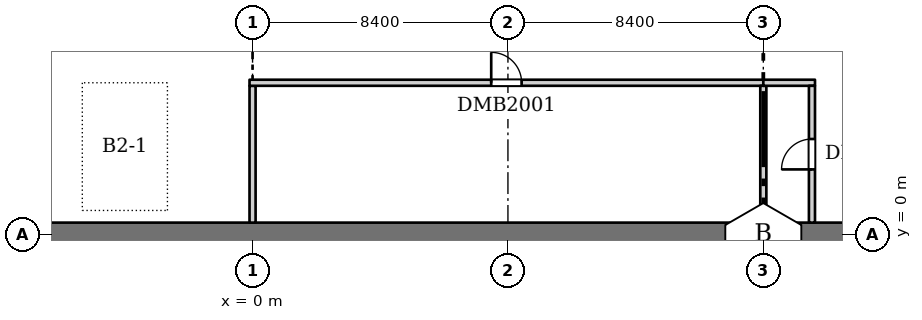
"""IFC4 building model, lengths in metres.
Left out: names, types, materials, properties, quantities, classifications, styles, units other than length and angle.
Written with IfcOpenShell. Run it as: python <this file> out.ifc"""

import sys

from ifc_helpers import new_model, si_unit, direction, frame, frame_2d, origin, place, context, subcontext, project, spatial, rectangle, extrude, element, fill, save


model = new_model("IFC4")
c1 = context("Model", 3, precision=1e-05, world=origin(), true_north=direction((0.0, 1.0)))
c2 = subcontext(c1, "Body", "Model", "MODEL_VIEW")
j1 = project(units=[si_unit("LENGTHUNIT", "METRE"), si_unit("PLANEANGLEUNIT", "RADIAN")], contexts=[c1])
p1 = place(None, origin())
s1 = spatial("IfcSite", under=j1, at=p1, CompositionType="ELEMENT")
p2 = place(p1, origin())
s2 = spatial("IfcBuilding", under=s1, at=p2, CompositionType="ELEMENT")
p3 = place(p2, frame((0.0, 0.0, -8.0)))
s3 = spatial("IfcBuildingStorey", under=s2, at=p3, CompositionType="ELEMENT", Elevation=-8.0)
p4 = place(p3, frame((-8.8, 0.0, 0.0), z_axis=(0.0, 0.0, 1.0), x_axis=(1.0, 0.0, 0.0)))
e1 = element("IfcWall", 1, at=p4, inside=s3, PredefinedType="SOLIDWALL", context=c2, shape_type="SweptSolid", body=[
    extrude(rectangle(XDim=76.0, YDim=0.8, at=frame_2d((38.0, 0.0))), origin(), (0.0, 0.0, 1.0), 3.7),
])
p5 = place(p3, frame((0.0, 0.4, 0.0), z_axis=(0.0, 0.0, 1.0), x_axis=(0.0, 1.0, 0.0)))
e2 = element("IfcWall", 2, at=p5, inside=s3, PredefinedType="PARTITIONING", context=c2, shape_type="SweptSolid", body=[
    extrude(rectangle(XDim=4.5, YDim=0.2, at=frame_2d((2.25, 0.0))), origin(), (0.0, 0.0, 1.0), 3.7),
])
p6 = place(p3, frame((-0.1, 5.0, 0.0), z_axis=(0.0, 0.0, 1.0), x_axis=(1.0, 0.0, 0.0)))
e3 = element("IfcWall", 3, at=p6, inside=s3, PredefinedType="PARTITIONING", context=c2, shape_type="SweptSolid", body=[
    extrude(rectangle(XDim=16.9, YDim=0.2, at=frame_2d((8.45, 0.0))), origin(), (0.0, 0.0, 1.0), 3.7),
])
p7 = place(p6, frame((7.95, 0.0, 0.0)))
e4 = element("IfcOpeningElement", 4, at=p7, cuts=e3, PredefinedType="OPENING", context=c2, shape_type="SweptSolid", body=[
    extrude(rectangle(XDim=1.0, YDim=2.1, at=frame_2d((0.5, 1.05))), frame((0.0, 0.11, 0.0), z_axis=(0.0, -1.0, 0.0), x_axis=(1.0, 0.0, 0.0)), (0.0, 0.0, 1.0), 0.22),
])
p8 = place(p3, frame((16.8, 0.4, 0.0), z_axis=(0.0, 0.0, 1.0), x_axis=(0.0, 1.0, 0.0)))
e5 = element("IfcWall", 5, at=p8, inside=s3, PredefinedType="PARTITIONING", context=c2, shape_type="SweptSolid", body=[
    extrude(rectangle(XDim=4.5, YDim=0.2, at=frame_2d((2.25, 0.0))), origin(), (0.0, 0.0, 1.0), 3.7),
])
p9 = place(p3, frame((16.8, 5.0, 0.0), z_axis=(0.0, 0.0, 1.0), x_axis=(1.0, 0.0, 0.0)))
e6 = element("IfcWall", 6, at=p9, inside=s3, PredefinedType="PARTITIONING", context=c2, shape_type="SweptSolid", body=[
    extrude(rectangle(XDim=1.7, YDim=0.2, at=frame_2d((0.85, 0.0))), origin(), (0.0, 0.0, 1.0), 3.7),
])
p10 = place(p3, frame((18.4, 0.4, 0.0), z_axis=(0.0, 0.0, 1.0), x_axis=(0.0, 1.0, 0.0)))
e7 = element("IfcWall", 7, at=p10, inside=s3, PredefinedType="PARTITIONING", context=c2, shape_type="SweptSolid", body=[
    extrude(rectangle(XDim=4.5, YDim=0.2, at=frame_2d((2.25, 0.0))), origin(), (0.0, 0.0, 1.0), 3.7),
])
p11 = place(p10, frame((1.75, 0.0, 0.0)))
e8 = element("IfcOpeningElement", 8, at=p11, cuts=e7, PredefinedType="OPENING", context=c2, shape_type="SweptSolid", body=[
    extrude(rectangle(XDim=1.0, YDim=2.1, at=frame_2d((0.5, 1.05))), frame((0.0, 0.11, 0.0), z_axis=(0.0, -1.0, 0.0), x_axis=(1.0, 0.0, 0.0)), (0.0, 0.0, 1.0), 0.22),
])
p12 = place(p7, origin())
e9 = element("IfcDoor", 9, at=p12, inside=s3, OperationType="SINGLE_SWING_LEFT", PredefinedType="DOOR", context=c2, shape_type="SweptSolid", body=[
    extrude(rectangle(XDim=1.0, YDim=2.1, at=frame_2d((0.5, 1.05))), frame((0.0, 0.025, 0.0), z_axis=(0.0, -1.0, 0.0), x_axis=(1.0, 0.0, 0.0)), (0.0, 0.0, 1.0), 0.05),
])
fill(e4, e9)
p13 = place(p11, origin())
e10 = element("IfcDoor", 10, at=p13, inside=s3, OperationType="SINGLE_SWING_LEFT", PredefinedType="DOOR", context=c2, shape_type="SweptSolid", body=[
    extrude(rectangle(XDim=1.0, YDim=2.1, at=frame_2d((0.5, 1.05))), frame((0.0, 0.025, 0.0), z_axis=(0.0, -1.0, 0.0), x_axis=(1.0, 0.0, 0.0)), (0.0, 0.0, 1.0), 0.05),
])
fill(e8, e10)
save(model, sys.argv[1])
